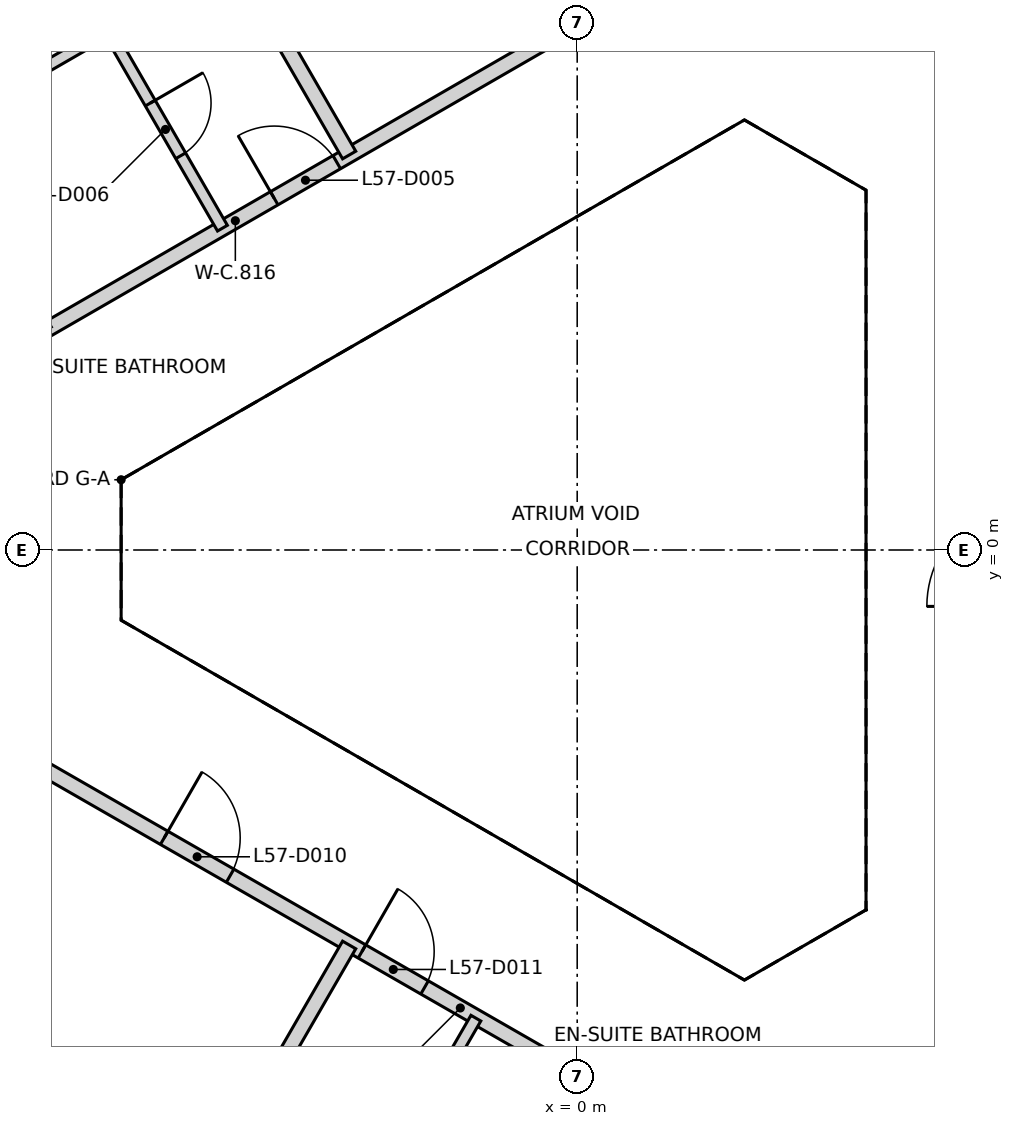
"""IFC4 building model, lengths in metres.
Left out: names, types, materials, properties, quantities, classifications, styles, units other than length and angle.
Written with IfcOpenShell. Run it as: python <this file> out.ifc"""

import sys

from ifc_helpers import new_model, si_unit, direction, frame, frame_2d, origin, place, context, subcontext, project, spatial, rectangle, extrude, element, fill, save


model = new_model("IFC4")
c1 = context("Model", 3, precision=1e-05, world=origin(), true_north=direction((0.0, 1.0)))
c2 = subcontext(c1, "Body", "Model", "MODEL_VIEW")
j1 = project(units=[si_unit("LENGTHUNIT", "METRE"), si_unit("PLANEANGLEUNIT", "RADIAN")], contexts=[c1])
p1 = place(None, origin())
s1 = spatial("IfcSite", under=j1, at=p1, CompositionType="ELEMENT")
p2 = place(p1, origin())
s2 = spatial("IfcBuilding", under=s1, at=p2, CompositionType="ELEMENT")
p3 = place(p2, frame((0.0, 0.0, 228.6)))
s3 = spatial("IfcBuildingStorey", under=s2, at=p3, CompositionType="ELEMENT", Elevation=228.6)
p4 = place(p3, frame((10.42, 6.498, 0.0), z_axis=(0.0, 0.0, 1.0), x_axis=(-0.866021906294, 0.500006057782, 0.0)))
e1 = element("IfcWall", 1, at=p4, inside=s3, PredefinedType="SHEAR", context=c2, shape_type="SweptSolid", body=[
    extrude(rectangle(XDim=11.55, YDim=0.25, at=frame_2d((5.775, 0.0))), origin(), (0.0, 0.0, 1.0), 3.25),
])
p5 = place(p4, frame((10.025, 0.0, 0.0)))
e2 = element("IfcOpeningElement", 2, at=p5, cuts=e1, PredefinedType="OPENING", context=c2, shape_type="SweptSolid", body=[
    extrude(rectangle(XDim=1.2, YDim=2.1, at=frame_2d((0.6, 1.05))), frame((0.0, 0.135, 0.0), z_axis=(0.0, -1.0, 0.0), x_axis=(1.0, 0.0, 0.0)), (0.0, 0.0, 1.0), 0.27),
])
p6 = place(p4, frame((8.725, 0.0, 0.0)))
e3 = element("IfcOpeningElement", 3, at=p6, cuts=e1, PredefinedType="OPENING", context=c2, shape_type="SweptSolid", body=[
    extrude(rectangle(XDim=1.2, YDim=2.1, at=frame_2d((0.6, 1.05))), frame((0.0, 0.135, 0.0), z_axis=(0.0, -1.0, 0.0), x_axis=(1.0, 0.0, 0.0)), (0.0, 0.0, 1.0), 0.27),
])
p7 = place(p3, frame((0.417, -12.273, 0.0), z_axis=(0.0, 0.0, 1.0), x_axis=(0.866021906294, 0.500006057782, 0.0)))
e4 = element("IfcWall", 4, at=p7, inside=s3, PredefinedType="SHEAR", context=c2, shape_type="SweptSolid", body=[
    extrude(rectangle(XDim=11.55, YDim=0.25, at=frame_2d((5.775, 0.0))), origin(), (0.0, 0.0, 1.0), 3.25),
])
p8 = place(p7, frame((10.025, 0.0, 0.0)))
e5 = element("IfcOpeningElement", 5, at=p8, cuts=e4, PredefinedType="OPENING", context=c2, shape_type="SweptSolid", body=[
    extrude(rectangle(XDim=1.2, YDim=2.1, at=frame_2d((0.6, 1.05))), frame((0.0, 0.135, 0.0), z_axis=(0.0, -1.0, 0.0), x_axis=(1.0, 0.0, 0.0)), (0.0, 0.0, 1.0), 0.27),
])
p9 = place(p7, frame((8.725, 0.0, 0.0)))
e6 = element("IfcOpeningElement", 6, at=p9, cuts=e4, PredefinedType="OPENING", context=c2, shape_type="SweptSolid", body=[
    extrude(rectangle(XDim=1.2, YDim=2.1, at=frame_2d((0.6, 1.05))), frame((0.0, 0.135, 0.0), z_axis=(0.0, -1.0, 0.0), x_axis=(1.0, 0.0, 0.0)), (0.0, 0.0, 1.0), 0.27),
])
p10 = place(p3, frame((-10.0, 1.155, 0.0), z_axis=(0.0, 0.0, 1.0), x_axis=(0.866014095592, 0.500019585852, 0.0)))
e7 = element("IfcWall", 7, at=p10, inside=s3, PredefinedType="PARTITIONING", context=c2, shape_type="SweptSolid", body=[
    extrude(rectangle(XDim=12.708, YDim=0.2, at=frame_2d((6.354, 0.0))), origin(), (0.0, 0.0, 1.0), 3.25),
])
p11 = place(p10, frame((6.944, 0.0, 0.0)))
e8 = element("IfcOpeningElement", 8, at=p11, cuts=e7, PredefinedType="OPENING", context=c2, shape_type="SweptSolid", body=[
    extrude(rectangle(XDim=0.95, YDim=2.1, at=frame_2d((0.475, 1.05))), frame((0.0, 0.11, 0.0), z_axis=(0.0, -1.0, 0.0), x_axis=(1.0, 0.0, 0.0)), (0.0, 0.0, 1.0), 0.22),
])
p12 = place(p10, frame((0.2, 0.0, 0.0)))
e9 = element("IfcOpeningElement", 9, at=p12, cuts=e7, PredefinedType="OPENING", context=c2, shape_type="SweptSolid", body=[
    extrude(rectangle(XDim=0.95, YDim=2.1, at=frame_2d((0.475, 1.05))), frame((0.0, 0.11, 0.0), z_axis=(0.0, -1.0, 0.0), x_axis=(1.0, 0.0, 0.0)), (0.0, 0.0, 1.0), 0.22),
])
p13 = place(p3, frame((-7.089, -2.836, 0.0), z_axis=(0.0, 0.0, 1.0), x_axis=(0.867106243364, -0.498123240493, 0.0)))
e10 = element("IfcWall", 10, at=p13, inside=s3, PredefinedType="PARTITIONING", context=c2, shape_type="SweptSolid", body=[
    extrude(rectangle(XDim=12.804, YDim=0.2, at=frame_2d((6.402, 0.0))), origin(), (0.0, 0.0, 1.0), 3.25),
])
p14 = place(p13, frame((1.909, 0.0, 0.0)))
e11 = element("IfcOpeningElement", 11, at=p14, cuts=e10, PredefinedType="OPENING", context=c2, shape_type="SweptSolid", body=[
    extrude(rectangle(XDim=1.0, YDim=2.1, at=frame_2d((0.5, 1.05))), frame((0.0, 0.11, 0.0), z_axis=(0.0, -1.0, 0.0), x_axis=(1.0, 0.0, 0.0)), (0.0, 0.0, 1.0), 0.22),
])
p15 = place(p13, frame((4.91, 0.0, 0.0)))
e12 = element("IfcOpeningElement", 12, at=p15, cuts=e10, PredefinedType="OPENING", context=c2, shape_type="SweptSolid", body=[
    extrude(rectangle(XDim=0.95, YDim=2.1, at=frame_2d((0.475, 1.05))), frame((0.0, 0.11, 0.0), z_axis=(0.0, -1.0, 0.0), x_axis=(1.0, 0.0, 0.0)), (0.0, 0.0, 1.0), 0.22),
])
p16 = place(p13, frame((11.654, 0.0, 0.0)))
e13 = element("IfcOpeningElement", 13, at=p16, cuts=e10, PredefinedType="OPENING", context=c2, shape_type="SweptSolid", body=[
    extrude(rectangle(XDim=0.95, YDim=2.1, at=frame_2d((0.475, 1.05))), frame((0.0, 0.11, 0.0), z_axis=(0.0, -1.0, 0.0), x_axis=(1.0, 0.0, 0.0)), (0.0, 0.0, 1.0), 0.22),
])
for number, where, z_axis, x_axis in (
    (14, (-9.119, 15.795, 0.0), (0.0, 0.0, 1.0), (0.5, -0.866, 0.0)),
    (15, (-9.119, -15.795, 0.0), (0.0, 0.0, 1.0), (0.5, 0.866, 0.0)),
):
    element("IfcWall", number, at=place(p3, frame(where, z_axis=z_axis, x_axis=x_axis)), inside=s3, PredefinedType="PARTITIONING", context=c2, shape_type="SweptSolid", body=[
        extrude(rectangle(XDim=12.238, YDim=0.2, at=frame_2d((6.119, 0.0))), origin(), (0.0, 0.0, 1.0), 3.25),
    ])
p17 = place(p3, frame((-10.114, 4.553, 0.0), z_axis=(0.0, 0.0, 1.0), x_axis=(0.866002713795, 0.500039298155, 0.0)))
e16 = element("IfcWall", 16, at=p17, inside=s3, PredefinedType="PARTITIONING", context=c2, shape_type="SweptSolid", body=[
    extrude(rectangle(XDim=4.558, YDim=0.15, at=frame_2d((2.279, 0.0))), origin(), (0.0, 0.0, 1.0), 3.25),
])
p18 = place(p3, frame((-6.167, 6.832, 0.0), z_axis=(0.0, 0.0, 1.0), x_axis=(0.499990139034, -0.866031096941, 0.0)))
e17 = element("IfcWall", 17, at=p18, inside=s3, PredefinedType="PARTITIONING", context=c2, shape_type="SweptSolid", body=[
    extrude(rectangle(XDim=3.0, YDim=0.15, at=frame_2d((1.5, 0.0))), origin(), (0.0, 0.0, 1.0), 3.25),
])
p19 = place(p18, frame((1.1, 0.0, 0.0)))
e18 = element("IfcOpeningElement", 18, at=p19, cuts=e17, PredefinedType="OPENING", context=c2, shape_type="SweptSolid", body=[
    extrude(rectangle(XDim=0.8, YDim=2.1, at=frame_2d((0.4, 1.05))), frame((0.0, 0.085, 0.0), z_axis=(0.0, -1.0, 0.0), x_axis=(1.0, 0.0, 0.0)), (0.0, 0.0, 1.0), 0.17),
])
p20 = place(p3, frame((-2.833, -8.757, 0.0), z_axis=(0.0, 0.0, 1.0), x_axis=(0.499990139034, 0.866031096941, 0.0)))
e19 = element("IfcWall", 19, at=p20, inside=s3, PredefinedType="PARTITIONING", context=c2, shape_type="SweptSolid", body=[
    extrude(rectangle(XDim=3.0, YDim=0.15, at=frame_2d((1.5, 0.0))), origin(), (0.0, 0.0, 1.0), 3.25),
])
p21 = place(p20, frame((1.1, 0.0, 0.0)))
e20 = element("IfcOpeningElement", 20, at=p21, cuts=e19, PredefinedType="OPENING", context=c2, shape_type="SweptSolid", body=[
    extrude(rectangle(XDim=0.8, YDim=2.1, at=frame_2d((0.4, 1.05))), frame((0.0, 0.085, 0.0), z_axis=(0.0, -1.0, 0.0), x_axis=(1.0, 0.0, 0.0)), (0.0, 0.0, 1.0), 0.17),
])
p22 = place(p11, origin())
e21 = element("IfcDoor", 21, at=p22, inside=s3, OperationType="SINGLE_SWING_LEFT", PredefinedType="DOOR", context=c2, shape_type="SweptSolid", body=[
    extrude(rectangle(XDim=0.95, YDim=2.1, at=frame_2d((0.475, 1.05))), frame((0.0, 0.025, 0.0), z_axis=(0.0, -1.0, 0.0), x_axis=(1.0, 0.0, 0.0)), (0.0, 0.0, 1.0), 0.05),
])
fill(e8, e21)
p23 = place(p19, frame((0.8, 0.0, 0.0), z_axis=(0.0, 0.0, 1.0), x_axis=(-1.0, 0.0, 0.0)))
e22 = element("IfcDoor", 22, at=p23, inside=s3, OperationType="SINGLE_SWING_LEFT", PredefinedType="DOOR", context=c2, shape_type="SweptSolid", body=[
    extrude(rectangle(XDim=0.8, YDim=2.1, at=frame_2d((0.4, 1.05))), frame((0.0, 0.025, 0.0), z_axis=(0.0, -1.0, 0.0), x_axis=(1.0, 0.0, 0.0)), (0.0, 0.0, 1.0), 0.05),
])
fill(e18, e22)
p24 = place(p14, frame((1.0, 0.0, 0.0), z_axis=(0.0, 0.0, 1.0), x_axis=(-1.0, 0.0, 0.0)))
e23 = element("IfcDoor", 23, at=p24, inside=s3, OperationType="SINGLE_SWING_LEFT", PredefinedType="DOOR", context=c2, shape_type="SweptSolid", body=[
    extrude(rectangle(XDim=1.0, YDim=2.1, at=frame_2d((0.5, 1.05))), frame((0.0, 0.025, 0.0), z_axis=(0.0, -1.0, 0.0), x_axis=(1.0, 0.0, 0.0)), (0.0, 0.0, 1.0), 0.05),
])
fill(e11, e23)
p25 = place(p15, frame((0.95, 0.0, 0.0), z_axis=(0.0, 0.0, 1.0), x_axis=(-1.0, 0.0, 0.0)))
e24 = element("IfcDoor", 24, at=p25, inside=s3, OperationType="SINGLE_SWING_LEFT", PredefinedType="DOOR", context=c2, shape_type="SweptSolid", body=[
    extrude(rectangle(XDim=0.95, YDim=2.1, at=frame_2d((0.475, 1.05))), frame((0.0, 0.025, 0.0), z_axis=(0.0, -1.0, 0.0), x_axis=(1.0, 0.0, 0.0)), (0.0, 0.0, 1.0), 0.05),
])
fill(e12, e24)
save(model, sys.argv[1])
